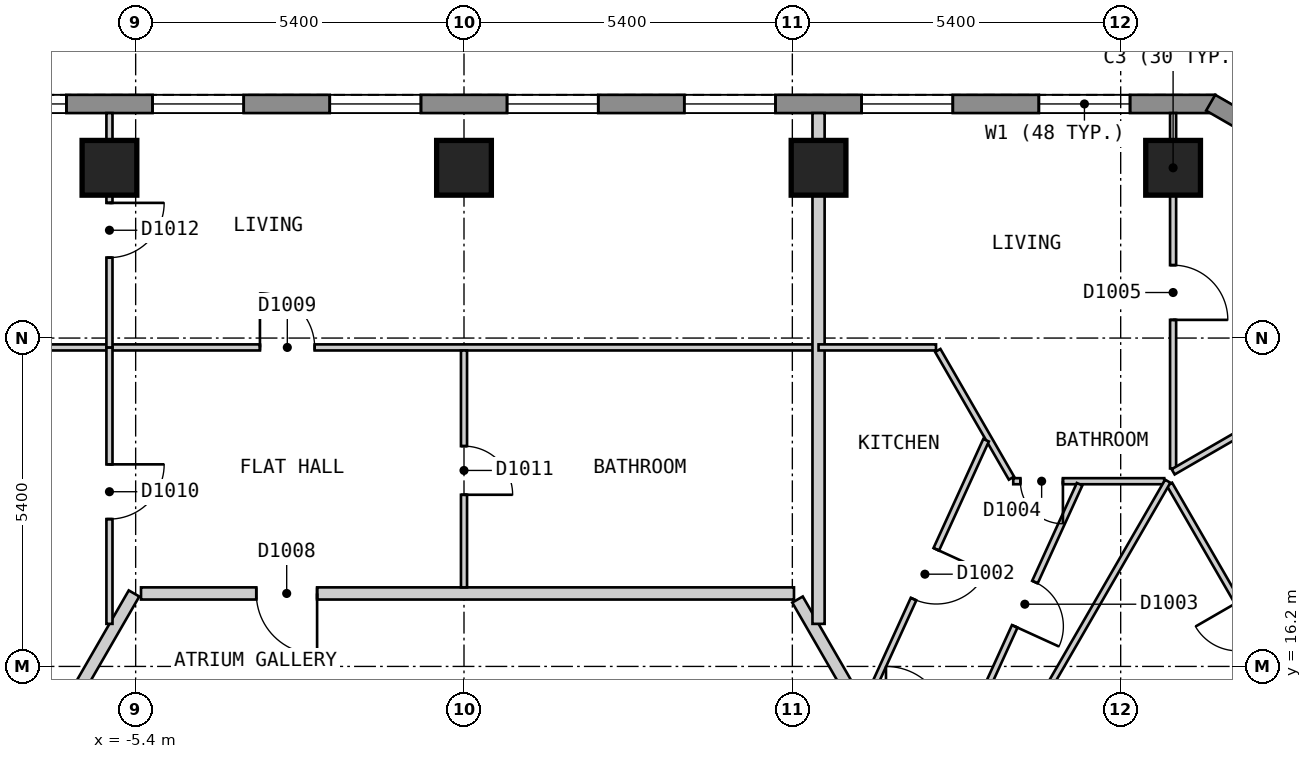
"""IFC4 building model, lengths in metres.
Left out: names, types, materials, properties, quantities, classifications, styles, units other than length and angle.
Written with IfcOpenShell. Run it as: python <this file> out.ifc"""

import sys

from ifc_helpers import new_model, si_unit, direction, frame, frame_2d, origin, origin_2d, place, context, subcontext, project, spatial, polyline, rectangle, outline, extrude, element, fill, save


model = new_model("IFC4")
c1 = context("Model", 3, precision=1e-05, world=origin(), true_north=direction((0.0, 1.0)))
c2 = subcontext(c1, "Body", "Model", "MODEL_VIEW")
j1 = project(units=[si_unit("LENGTHUNIT", "METRE"), si_unit("PLANEANGLEUNIT", "RADIAN")], contexts=[c1])
p1 = place(None, origin())
s1 = spatial("IfcSite", under=j1, at=p1, CompositionType="ELEMENT")
p2 = place(p1, origin())
s2 = spatial("IfcBuilding", under=s1, at=p2, CompositionType="ELEMENT")
p3 = place(p2, frame((0.0, 0.0, 126.6)))
s3 = spatial("IfcBuildingStorey", under=s2, at=p3, CompositionType="ELEMENT", Elevation=126.6)
for number, where, z_axis, x_axis in (
    (1, (11.662, 24.4, 0.0), (0.0, 0.0, 1.0), (-1.0, 0.0, 0.0)),
    (2, (5.831, 24.4, 0.0), (0.0, 0.0, 1.0), (-1.0, 0.0, 0.0)),
    (3, (0.0, 24.4, 0.0), (0.0, 0.0, 1.0), (-1.0, 0.0, 0.0)),
    (4, (-5.831, 24.4, 0.0), (0.0, 0.0, 1.0), (-1.0, 0.0, 0.0)),
):
    element("IfcColumn", number, at=place(p3, frame(where, z_axis=z_axis, x_axis=x_axis)), inside=s3, PredefinedType="COLUMN", context=c2, shape_type="SweptSolid", body=[
        extrude(rectangle(XDim=0.9, YDim=0.9, at=origin_2d()), origin(), (0.0, 0.0, 1.0), 3.0),
    ])
p4 = place(p3, frame((12.355, 25.45, 0.0), z_axis=(0.0, 0.0, 1.0), x_axis=(-1.0, 0.0, 0.0)))
e5 = element("IfcWall", 5, at=p4, inside=s3, PredefinedType="SOLIDWALL", context=c2, shape_type="SweptSolid", body=[
    extrude(outline(polyline([(0.0, -0.15), (24.71, -0.15), (24.63, 0.15), (0.08, 0.15), (0.0, -0.15)])), origin(), (0.0, 0.0, 1.0), 2.7),
])
p5 = place(p4, frame((1.401, 0.0, 0.15)))
e6 = element("IfcOpeningElement", 6, at=p5, cuts=e5, PredefinedType="OPENING", context=c2, shape_type="SweptSolid", body=[
    extrude(rectangle(XDim=1.5, YDim=2.1, at=frame_2d((0.75, 1.05))), frame((0.0, 0.16, 0.0), z_axis=(0.0, -1.0, 0.0), x_axis=(1.0, 0.0, 0.0)), (0.0, 0.0, 1.0), 0.32),
])
p6 = place(p4, frame((4.316, 0.0, 0.15)))
e7 = element("IfcOpeningElement", 7, at=p6, cuts=e5, PredefinedType="OPENING", context=c2, shape_type="SweptSolid", body=[
    extrude(rectangle(XDim=1.5, YDim=2.1, at=frame_2d((0.75, 1.05))), frame((0.0, 0.16, 0.0), z_axis=(0.0, -1.0, 0.0), x_axis=(1.0, 0.0, 0.0)), (0.0, 0.0, 1.0), 0.32),
])
p7 = place(p4, frame((7.232, 0.0, 0.15)))
e8 = element("IfcOpeningElement", 8, at=p7, cuts=e5, PredefinedType="OPENING", context=c2, shape_type="SweptSolid", body=[
    extrude(rectangle(XDim=1.5, YDim=2.1, at=frame_2d((0.75, 1.05))), frame((0.0, 0.16, 0.0), z_axis=(0.0, -1.0, 0.0), x_axis=(1.0, 0.0, 0.0)), (0.0, 0.0, 1.0), 0.32),
])
p8 = place(p4, frame((10.147, 0.0, 0.15)))
e9 = element("IfcOpeningElement", 9, at=p8, cuts=e5, PredefinedType="OPENING", context=c2, shape_type="SweptSolid", body=[
    extrude(rectangle(XDim=1.5, YDim=2.1, at=frame_2d((0.75, 1.05))), frame((0.0, 0.16, 0.0), z_axis=(0.0, -1.0, 0.0), x_axis=(1.0, 0.0, 0.0)), (0.0, 0.0, 1.0), 0.32),
])
p9 = place(p4, frame((13.063, 0.0, 0.15)))
e10 = element("IfcOpeningElement", 10, at=p9, cuts=e5, PredefinedType="OPENING", context=c2, shape_type="SweptSolid", body=[
    extrude(rectangle(XDim=1.5, YDim=2.1, at=frame_2d((0.75, 1.05))), frame((0.0, 0.16, 0.0), z_axis=(0.0, -1.0, 0.0), x_axis=(1.0, 0.0, 0.0)), (0.0, 0.0, 1.0), 0.32),
])
p10 = place(p4, frame((15.978, 0.0, 0.15)))
e11 = element("IfcOpeningElement", 11, at=p10, cuts=e5, PredefinedType="OPENING", context=c2, shape_type="SweptSolid", body=[
    extrude(rectangle(XDim=1.5, YDim=2.1, at=frame_2d((0.75, 1.05))), frame((0.0, 0.16, 0.0), z_axis=(0.0, -1.0, 0.0), x_axis=(1.0, 0.0, 0.0)), (0.0, 0.0, 1.0), 0.32),
])
p11 = place(p4, frame((18.894, 0.0, 0.15)))
e12 = element("IfcOpeningElement", 12, at=p11, cuts=e5, PredefinedType="OPENING", context=c2, shape_type="SweptSolid", body=[
    extrude(rectangle(XDim=1.5, YDim=2.1, at=frame_2d((0.75, 1.05))), frame((0.0, 0.16, 0.0), z_axis=(0.0, -1.0, 0.0), x_axis=(1.0, 0.0, 0.0)), (0.0, 0.0, 1.0), 0.32),
])
p12 = place(p4, frame((21.809, 0.0, 0.15)))
e13 = element("IfcOpeningElement", 13, at=p12, cuts=e5, PredefinedType="OPENING", context=c2, shape_type="SweptSolid", body=[
    extrude(rectangle(XDim=1.5, YDim=2.1, at=frame_2d((0.75, 1.05))), frame((0.0, 0.16, 0.0), z_axis=(0.0, -1.0, 0.0), x_axis=(1.0, 0.0, 0.0)), (0.0, 0.0, 1.0), 0.32),
])
p13 = place(p3, frame((16.61, 22.97, 0.0), z_axis=(0.0, 0.0, 1.0), x_axis=(-0.866022959057, 0.500004234368, 0.0)))
e14 = element("IfcWall", 14, at=p13, inside=s3, PredefinedType="SOLIDWALL", context=c2, shape_type="SweptSolid", body=[
    extrude(outline(polyline([(0.0, -0.15), (5.0, -0.15), (4.92, 0.15), (0.08, 0.15), (0.0, -0.15)])), origin(), (0.0, 0.0, 1.0), 2.7),
])
p14 = place(p13, frame((0.65, 0.0, 0.15)))
e15 = element("IfcOpeningElement", 15, at=p14, cuts=e14, PredefinedType="OPENING", context=c2, shape_type="SweptSolid", body=[
    extrude(rectangle(XDim=1.2, YDim=2.1, at=frame_2d((0.6, 1.05))), frame((0.0, 0.16, 0.0), z_axis=(0.0, -1.0, 0.0), x_axis=(1.0, 0.0, 0.0)), (0.0, 0.0, 1.0), 0.32),
])
p15 = place(p13, frame((3.15, 0.0, 0.15)))
e16 = element("IfcOpeningElement", 16, at=p15, cuts=e14, PredefinedType="OPENING", context=c2, shape_type="SweptSolid", body=[
    extrude(rectangle(XDim=1.2, YDim=2.1, at=frame_2d((0.6, 1.05))), frame((0.0, 0.16, 0.0), z_axis=(0.0, -1.0, 0.0), x_axis=(1.0, 0.0, 0.0)), (0.0, 0.0, 1.0), 0.32),
])
p16 = place(p3, frame((5.485, 17.3, 0.0), z_axis=(0.0, 0.0, 1.0), x_axis=(0.500027479704, -0.866009537788, 0.0)))
e17 = element("IfcWall", 17, at=p16, inside=s3, PredefinedType="PARTITIONING", context=c2, shape_type="SweptSolid", body=[
    extrude(rectangle(XDim=2.309, YDim=0.2, at=frame_2d((1.155, 0.0))), origin(), (0.0, 0.0, 1.0), 2.7),
])
p17 = place(p3, frame((-5.312, 17.4, 0.0), z_axis=(0.0, 0.0, 1.0), x_axis=(1.0, 0.0, 0.0)))
e18 = element("IfcWall", 18, at=p17, inside=s3, PredefinedType="PARTITIONING", context=c2, shape_type="SweptSolid", body=[
    extrude(rectangle(XDim=10.739, YDim=0.2, at=frame_2d((5.37, 0.0))), origin(), (0.0, 0.0, 1.0), 2.7),
])
p18 = place(p17, frame((1.896, 0.0, 0.0)))
e19 = element("IfcOpeningElement", 19, at=p18, cuts=e18, PredefinedType="OPENING", context=c2, shape_type="SweptSolid", body=[
    extrude(rectangle(XDim=1.0, YDim=2.1, at=frame_2d((0.5, 1.05))), frame((0.0, 0.11, 0.0), z_axis=(0.0, -1.0, 0.0), x_axis=(1.0, 0.0, 0.0)), (0.0, 0.0, 1.0), 0.22),
])
p19 = place(p3, frame((-6.697, 15.2, 0.0), z_axis=(0.0, 0.0, 1.0), x_axis=(0.499963722229, 0.866046347752, 0.0)))
e20 = element("IfcWall", 20, at=p19, inside=s3, PredefinedType="PARTITIONING", context=c2, shape_type="SweptSolid", body=[
    extrude(rectangle(XDim=2.54, YDim=0.2, at=frame_2d((1.27, 0.0))), origin(), (0.0, 0.0, 1.0), 2.7),
])
p20 = place(p3, frame((7.792, 21.396, 0.0), z_axis=(0.0, 0.0, 1.0), x_axis=(0.499821239653, -0.866128586522, 0.0)))
e21 = element("IfcWall", 21, at=p20, inside=s3, PredefinedType="PARTITIONING", context=c2, shape_type="SweptSolid", body=[
    extrude(rectangle(XDim=2.425, YDim=0.1, at=frame_2d((1.212, 0.0))), origin(), (0.0, 0.0, 1.0), 2.7),
])
p21 = place(p3, frame((11.603, 19.196, 0.0), z_axis=(0.0, 0.0, 1.0), x_axis=(0.499913406181, -0.866075392977, 0.0)))
e22 = element("IfcWall", 22, at=p21, inside=s3, PredefinedType="PARTITIONING", context=c2, shape_type="SweptSolid", body=[
    extrude(rectangle(XDim=5.239, YDim=0.1, at=frame_2d((2.619, 0.0))), origin(), (0.0, 0.0, 1.0), 2.7),
])
p22 = place(p21, frame((2.24, 0.0, 0.0)))
e23 = element("IfcOpeningElement", 23, at=p22, cuts=e22, PredefinedType="OPENING", context=c2, shape_type="SweptSolid", body=[
    extrude(rectangle(XDim=0.8, YDim=2.1, at=frame_2d((0.4, 1.05))), frame((0.0, 0.06, 0.0), z_axis=(0.0, -1.0, 0.0), x_axis=(1.0, 0.0, 0.0)), (0.0, 0.0, 1.0), 0.12),
])
p23 = place(p3, frame((9.033, 19.246, 0.0), z_axis=(0.0, 0.0, 1.0), x_axis=(1.0, 0.0, 0.0)))
e24 = element("IfcWall", 24, at=p23, inside=s3, PredefinedType="PARTITIONING", context=c2, shape_type="SweptSolid", body=[
    extrude(rectangle(XDim=2.483, YDim=0.1, at=frame_2d((1.242, 0.0))), origin(), (0.0, 0.0, 1.0), 2.7),
])
p24 = place(p23, frame((0.117, 0.0, 0.0)))
e25 = element("IfcOpeningElement", 25, at=p24, cuts=e24, PredefinedType="OPENING", context=c2, shape_type="SweptSolid", body=[
    extrude(rectangle(XDim=0.7, YDim=2.1, at=frame_2d((0.35, 1.05))), frame((0.0, 0.06, 0.0), z_axis=(0.0, -1.0, 0.0), x_axis=(1.0, 0.0, 0.0)), (0.0, 0.0, 1.0), 0.12),
])
p25 = place(p3, frame((-7.706, 21.446, 0.0), z_axis=(0.0, 0.0, 1.0), x_axis=(1.0, 0.0, 0.0)))
e26 = element("IfcWall", 26, at=p25, inside=s3, PredefinedType="PARTITIONING", context=c2, shape_type="SweptSolid", body=[
    extrude(rectangle(XDim=13.537, YDim=0.1, at=frame_2d((6.769, 0.0))), origin(), (0.0, 0.0, 1.0), 2.7),
])
p26 = place(p25, frame((4.35, 0.0, 0.0)))
e27 = element("IfcOpeningElement", 27, at=p26, cuts=e26, PredefinedType="OPENING", context=c2, shape_type="SweptSolid", body=[
    extrude(rectangle(XDim=0.9, YDim=2.1, at=frame_2d((0.45, 1.05))), frame((0.0, 0.06, 0.0), z_axis=(0.0, -1.0, 0.0), x_axis=(1.0, 0.0, 0.0)), (0.0, 0.0, 1.0), 0.12),
])
p27 = place(p3, frame((9.238, 15.2, 0.0), z_axis=(0.0, 0.0, 1.0), x_axis=(0.499983303743, 0.866035043158, 0.0)))
e28 = element("IfcWall", 28, at=p27, inside=s3, PredefinedType="PARTITIONING", context=c2, shape_type="SweptSolid", body=[
    extrude(rectangle(XDim=4.672, YDim=0.1, at=frame_2d((2.336, 0.0))), origin(), (0.0, 0.0, 1.0), 2.7),
])
p28 = place(p3, frame((8.346, 15.3, 0.0), z_axis=(0.0, 0.0, 1.0), x_axis=(0.415189790387, 0.909734817383, 0.0)))
e29 = element("IfcWall", 29, at=p28, inside=s3, PredefinedType="PARTITIONING", context=c2, shape_type="SweptSolid", body=[
    extrude(rectangle(XDim=4.282, YDim=0.1, at=frame_2d((2.141, 0.0))), origin(), (0.0, 0.0, 1.0), 2.7),
])
p29 = place(p28, frame((1.714, 0.0, 0.0)))
e30 = element("IfcOpeningElement", 30, at=p29, cuts=e29, PredefinedType="OPENING", context=c2, shape_type="SweptSolid", body=[
    extrude(rectangle(XDim=0.8, YDim=2.1, at=frame_2d((0.4, 1.05))), frame((0.0, 0.06, 0.0), z_axis=(0.0, -1.0, 0.0), x_axis=(1.0, 0.0, 0.0)), (0.0, 0.0, 1.0), 0.12),
])
p30 = place(p3, frame((6.6, 15.569, 0.0), z_axis=(0.0, 0.0, 1.0), x_axis=(0.415221636251, 0.909720282718, 0.0)))
e31 = element("IfcWall", 31, at=p30, inside=s3, PredefinedType="PARTITIONING", context=c2, shape_type="SweptSolid", body=[
    extrude(rectangle(XDim=4.783, YDim=0.1, at=frame_2d((2.391, 0.0))), origin(), (0.0, 0.0, 1.0), 2.7),
])
p31 = place(p30, frame((1.911, 0.0, 0.0)))
e32 = element("IfcOpeningElement", 32, at=p31, cuts=e31, PredefinedType="OPENING", context=c2, shape_type="SweptSolid", body=[
    extrude(rectangle(XDim=0.9, YDim=2.1, at=frame_2d((0.45, 1.05))), frame((0.0, 0.06, 0.0), z_axis=(0.0, -1.0, 0.0), x_axis=(1.0, 0.0, 0.0)), (0.0, 0.0, 1.0), 0.12),
])
p32 = place(p3, frame((11.662, 19.456, 0.0), z_axis=(0.0, 0.0, 1.0), x_axis=(0.0, 1.0, 0.0)))
e33 = element("IfcWall", 33, at=p32, inside=s3, PredefinedType="PARTITIONING", context=c2, shape_type="SweptSolid", body=[
    extrude(rectangle(XDim=5.844, YDim=0.1, at=frame_2d((2.922, 0.0))), origin(), (0.0, 0.0, 1.0), 2.7),
])
p33 = place(p32, frame((2.443, 0.0, 0.0)))
e34 = element("IfcOpeningElement", 34, at=p33, cuts=e33, PredefinedType="OPENING", context=c2, shape_type="SweptSolid", body=[
    extrude(rectangle(XDim=0.9, YDim=2.1, at=frame_2d((0.45, 1.05))), frame((0.0, 0.06, 0.0), z_axis=(0.0, -1.0, 0.0), x_axis=(1.0, 0.0, 0.0)), (0.0, 0.0, 1.0), 0.12),
])
p34 = place(p3, frame((0.0, 17.5, 0.0), z_axis=(0.0, 0.0, 1.0), x_axis=(0.0, 1.0, 0.0)))
e35 = element("IfcWall", 35, at=p34, inside=s3, PredefinedType="PARTITIONING", context=c2, shape_type="SweptSolid", body=[
    extrude(rectangle(XDim=3.896, YDim=0.1, at=frame_2d((1.948, 0.0))), origin(), (0.0, 0.0, 1.0), 2.7),
])
p35 = place(p34, frame((1.523, 0.0, 0.0)))
e36 = element("IfcOpeningElement", 36, at=p35, cuts=e35, PredefinedType="OPENING", context=c2, shape_type="SweptSolid", body=[
    extrude(rectangle(XDim=0.8, YDim=2.1, at=frame_2d((0.4, 1.05))), frame((0.0, 0.06, 0.0), z_axis=(0.0, -1.0, 0.0), x_axis=(1.0, 0.0, 0.0)), (0.0, 0.0, 1.0), 0.12),
])
p36 = place(p3, frame((-5.831, 16.9, 0.0), z_axis=(0.0, 0.0, 1.0), x_axis=(0.0, 1.0, 0.0)))
e37 = element("IfcWall", 37, at=p36, inside=s3, PredefinedType="PARTITIONING", context=c2, shape_type="SweptSolid", body=[
    extrude(rectangle(XDim=4.546, YDim=0.1, at=frame_2d((2.273, 0.0))), origin(), (0.0, 0.0, 1.0), 2.7),
])
p37 = place(p36, frame((1.723, 0.0, 0.0)))
e38 = element("IfcOpeningElement", 38, at=p37, cuts=e37, PredefinedType="OPENING", context=c2, shape_type="SweptSolid", body=[
    extrude(rectangle(XDim=0.9, YDim=2.1, at=frame_2d((0.45, 1.05))), frame((0.0, 0.06, 0.0), z_axis=(0.0, -1.0, 0.0), x_axis=(1.0, 0.0, 0.0)), (0.0, 0.0, 1.0), 0.12),
])
p38 = place(p3, frame((11.663, 19.4, 0.0), z_axis=(0.0, 0.0, 1.0), x_axis=(0.865941558533, 0.500145196124, 0.0)))
e39 = element("IfcWall", 39, at=p38, inside=s3, PredefinedType="PARTITIONING", context=c2, shape_type="SweptSolid", body=[
    extrude(rectangle(XDim=5.899, YDim=0.1, at=frame_2d((2.949, 0.0))), origin(), (0.0, 0.0, 1.0), 2.7),
])
p39 = place(p38, frame((2.499, 0.0, 0.0)))
e40 = element("IfcOpeningElement", 40, at=p39, cuts=e39, PredefinedType="OPENING", context=c2, shape_type="SweptSolid", body=[
    extrude(rectangle(XDim=0.9, YDim=2.1, at=frame_2d((0.45, 1.05))), frame((0.0, 0.06, 0.0), z_axis=(0.0, -1.0, 0.0), x_axis=(1.0, 0.0, 0.0)), (0.0, 0.0, 1.0), 0.12),
])
p40 = place(p3, frame((5.831, 16.9, 0.0), z_axis=(0.0, 0.0, 1.0), x_axis=(0.0, 1.0, 0.0)))
e41 = element("IfcWall", 41, at=p40, inside=s3, PredefinedType="PARTITIONING", context=c2, shape_type="SweptSolid", body=[
    extrude(rectangle(XDim=8.4, YDim=0.2, at=frame_2d((4.2, 0.0))), origin(), (0.0, 0.0, 1.0), 2.7),
])
p41 = place(p3, frame((-5.831, 21.446, 0.0), z_axis=(0.0, 0.0, 1.0), x_axis=(0.0, 1.0, 0.0)))
e42 = element("IfcWall", 42, at=p41, inside=s3, PredefinedType="PARTITIONING", context=c2, shape_type="SweptSolid", body=[
    extrude(rectangle(XDim=3.854, YDim=0.1, at=frame_2d((1.927, 0.0))), origin(), (0.0, 0.0, 1.0), 2.7),
])
p42 = place(p41, frame((1.477, 0.0, 0.0)))
e43 = element("IfcOpeningElement", 43, at=p42, cuts=e42, PredefinedType="OPENING", context=c2, shape_type="SweptSolid", body=[
    extrude(rectangle(XDim=0.9, YDim=2.1, at=frame_2d((0.45, 1.05))), frame((0.0, 0.06, 0.0), z_axis=(0.0, -1.0, 0.0), x_axis=(1.0, 0.0, 0.0)), (0.0, 0.0, 1.0), 0.12),
])
p43 = place(p3, frame((5.831, 21.446, 0.0), z_axis=(0.0, 0.0, 1.0), x_axis=(1.0, 0.0, 0.0)))
e44 = element("IfcWall", 44, at=p43, inside=s3, PredefinedType="PARTITIONING", context=c2, shape_type="SweptSolid", body=[
    extrude(rectangle(XDim=1.932, YDim=0.1, at=frame_2d((0.966, 0.0))), origin(), (0.0, 0.0, 1.0), 2.7),
])
p44 = place(p5, origin())
e45 = element("IfcWindow", 45, at=p44, inside=s3, PartitioningType="SINGLE_PANEL", PredefinedType="WINDOW", context=c2, shape_type="SweptSolid", body=[
    extrude(rectangle(XDim=1.5, YDim=2.1, at=frame_2d((0.75, 1.05))), frame((0.0, 0.03, 0.0), z_axis=(0.0, -1.0, 0.0), x_axis=(1.0, 0.0, 0.0)), (0.0, 0.0, 1.0), 0.06),
])
fill(e6, e45)
p45 = place(p6, origin())
e46 = element("IfcWindow", 46, at=p45, inside=s3, PartitioningType="SINGLE_PANEL", PredefinedType="WINDOW", context=c2, shape_type="SweptSolid", body=[
    extrude(rectangle(XDim=1.5, YDim=2.1, at=frame_2d((0.75, 1.05))), frame((0.0, 0.03, 0.0), z_axis=(0.0, -1.0, 0.0), x_axis=(1.0, 0.0, 0.0)), (0.0, 0.0, 1.0), 0.06),
])
fill(e7, e46)
p46 = place(p7, origin())
e47 = element("IfcWindow", 47, at=p46, inside=s3, PartitioningType="SINGLE_PANEL", PredefinedType="WINDOW", context=c2, shape_type="SweptSolid", body=[
    extrude(rectangle(XDim=1.5, YDim=2.1, at=frame_2d((0.75, 1.05))), frame((0.0, 0.03, 0.0), z_axis=(0.0, -1.0, 0.0), x_axis=(1.0, 0.0, 0.0)), (0.0, 0.0, 1.0), 0.06),
])
fill(e8, e47)
p47 = place(p8, origin())
e48 = element("IfcWindow", 48, at=p47, inside=s3, PartitioningType="SINGLE_PANEL", PredefinedType="WINDOW", context=c2, shape_type="SweptSolid", body=[
    extrude(rectangle(XDim=1.5, YDim=2.1, at=frame_2d((0.75, 1.05))), frame((0.0, 0.03, 0.0), z_axis=(0.0, -1.0, 0.0), x_axis=(1.0, 0.0, 0.0)), (0.0, 0.0, 1.0), 0.06),
])
fill(e9, e48)
p48 = place(p9, origin())
e49 = element("IfcWindow", 49, at=p48, inside=s3, PartitioningType="SINGLE_PANEL", PredefinedType="WINDOW", context=c2, shape_type="SweptSolid", body=[
    extrude(rectangle(XDim=1.5, YDim=2.1, at=frame_2d((0.75, 1.05))), frame((0.0, 0.03, 0.0), z_axis=(0.0, -1.0, 0.0), x_axis=(1.0, 0.0, 0.0)), (0.0, 0.0, 1.0), 0.06),
])
fill(e10, e49)
p49 = place(p10, origin())
e50 = element("IfcWindow", 50, at=p49, inside=s3, PartitioningType="SINGLE_PANEL", PredefinedType="WINDOW", context=c2, shape_type="SweptSolid", body=[
    extrude(rectangle(XDim=1.5, YDim=2.1, at=frame_2d((0.75, 1.05))), frame((0.0, 0.03, 0.0), z_axis=(0.0, -1.0, 0.0), x_axis=(1.0, 0.0, 0.0)), (0.0, 0.0, 1.0), 0.06),
])
fill(e11, e50)
p50 = place(p11, origin())
e51 = element("IfcWindow", 51, at=p50, inside=s3, PartitioningType="SINGLE_PANEL", PredefinedType="WINDOW", context=c2, shape_type="SweptSolid", body=[
    extrude(rectangle(XDim=1.5, YDim=2.1, at=frame_2d((0.75, 1.05))), frame((0.0, 0.03, 0.0), z_axis=(0.0, -1.0, 0.0), x_axis=(1.0, 0.0, 0.0)), (0.0, 0.0, 1.0), 0.06),
])
fill(e12, e51)
p51 = place(p31, origin())
e52 = element("IfcDoor", 52, at=p51, inside=s3, OperationType="SINGLE_SWING_RIGHT", PredefinedType="DOOR", context=c2, shape_type="SweptSolid", body=[
    extrude(rectangle(XDim=0.9, YDim=2.1, at=frame_2d((0.45, 1.05))), frame((0.0, 0.025, 0.0), z_axis=(0.0, -1.0, 0.0), x_axis=(1.0, 0.0, 0.0)), (0.0, 0.0, 1.0), 0.05),
])
fill(e32, e52)
p52 = place(p29, origin())
e53 = element("IfcDoor", 53, at=p52, inside=s3, OperationType="SINGLE_SWING_LEFT", PredefinedType="DOOR", context=c2, shape_type="SweptSolid", body=[
    extrude(rectangle(XDim=0.8, YDim=2.1, at=frame_2d((0.4, 1.05))), frame((0.0, 0.025, 0.0), z_axis=(0.0, -1.0, 0.0), x_axis=(1.0, 0.0, 0.0)), (0.0, 0.0, 1.0), 0.05),
])
fill(e30, e53)
p53 = place(p24, origin())
e54 = element("IfcDoor", 54, at=p53, inside=s3, OperationType="SINGLE_SWING_RIGHT", PredefinedType="DOOR", context=c2, shape_type="SweptSolid", body=[
    extrude(rectangle(XDim=0.7, YDim=2.1, at=frame_2d((0.35, 1.05))), frame((0.0, 0.025, 0.0), z_axis=(0.0, -1.0, 0.0), x_axis=(1.0, 0.0, 0.0)), (0.0, 0.0, 1.0), 0.05),
])
fill(e25, e54)
p54 = place(p33, origin())
e55 = element("IfcDoor", 55, at=p54, inside=s3, OperationType="SINGLE_SWING_LEFT", PredefinedType="DOOR", context=c2, shape_type="SweptSolid", body=[
    extrude(rectangle(XDim=0.9, YDim=2.1, at=frame_2d((0.45, 1.05))), frame((0.0, 0.025, 0.0), z_axis=(0.0, -1.0, 0.0), x_axis=(1.0, 0.0, 0.0)), (0.0, 0.0, 1.0), 0.05),
])
fill(e34, e55)
p55 = place(p18, origin())
e56 = element("IfcDoor", 56, at=p55, inside=s3, OperationType="SINGLE_SWING_RIGHT", PredefinedType="DOOR", context=c2, shape_type="SweptSolid", body=[
    extrude(rectangle(XDim=1.0, YDim=2.1, at=frame_2d((0.5, 1.05))), frame((0.0, 0.025, 0.0), z_axis=(0.0, -1.0, 0.0), x_axis=(1.0, 0.0, 0.0)), (0.0, 0.0, 1.0), 0.05),
])
fill(e19, e56)
p56 = place(p26, origin())
e57 = element("IfcDoor", 57, at=p56, inside=s3, OperationType="SINGLE_SWING_LEFT", PredefinedType="DOOR", context=c2, shape_type="SweptSolid", body=[
    extrude(rectangle(XDim=0.9, YDim=2.1, at=frame_2d((0.45, 1.05))), frame((0.0, 0.025, 0.0), z_axis=(0.0, -1.0, 0.0), x_axis=(1.0, 0.0, 0.0)), (0.0, 0.0, 1.0), 0.05),
])
fill(e27, e57)
p57 = place(p37, origin())
e58 = element("IfcDoor", 58, at=p57, inside=s3, OperationType="SINGLE_SWING_RIGHT", PredefinedType="DOOR", context=c2, shape_type="SweptSolid", body=[
    extrude(rectangle(XDim=0.9, YDim=2.1, at=frame_2d((0.45, 1.05))), frame((0.0, 0.025, 0.0), z_axis=(0.0, -1.0, 0.0), x_axis=(1.0, 0.0, 0.0)), (0.0, 0.0, 1.0), 0.05),
])
fill(e38, e58)
p58 = place(p35, origin())
e59 = element("IfcDoor", 59, at=p58, inside=s3, OperationType="SINGLE_SWING_LEFT", PredefinedType="DOOR", context=c2, shape_type="SweptSolid", body=[
    extrude(rectangle(XDim=0.8, YDim=2.1, at=frame_2d((0.4, 1.05))), frame((0.0, 0.025, 0.0), z_axis=(0.0, -1.0, 0.0), x_axis=(1.0, 0.0, 0.0)), (0.0, 0.0, 1.0), 0.05),
])
fill(e36, e59)
p59 = place(p42, origin())
e60 = element("IfcDoor", 60, at=p59, inside=s3, OperationType="SINGLE_SWING_RIGHT", PredefinedType="DOOR", context=c2, shape_type="SweptSolid", body=[
    extrude(rectangle(XDim=0.9, YDim=2.1, at=frame_2d((0.45, 1.05))), frame((0.0, 0.025, 0.0), z_axis=(0.0, -1.0, 0.0), x_axis=(1.0, 0.0, 0.0)), (0.0, 0.0, 1.0), 0.05),
])
fill(e43, e60)
save(model, sys.argv[1])
